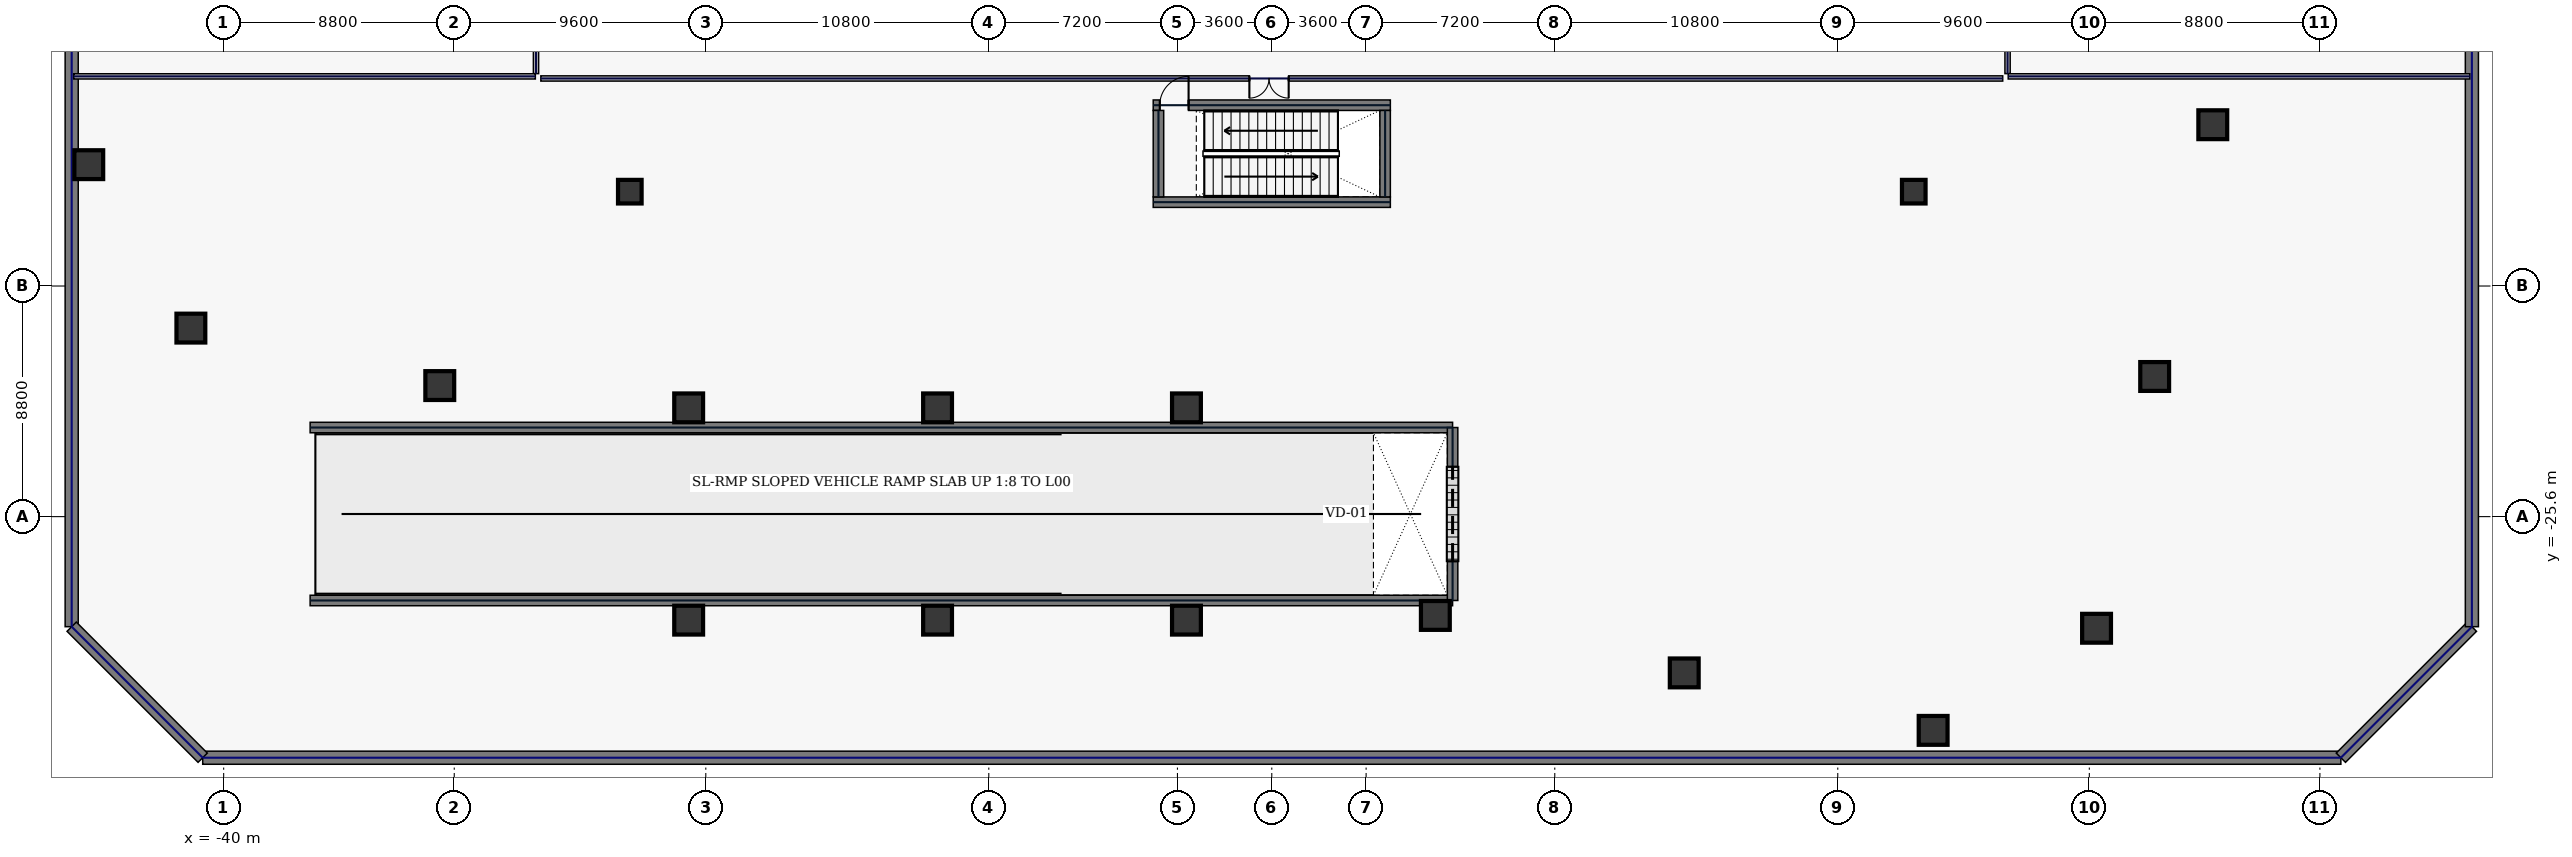
"""IFC4 building model, lengths in metres.
Left out: names, types, materials, properties, quantities, classifications, styles, units other than length and angle.
Written with IfcOpenShell. Run it as: python <this file> out.ifc"""

import sys

from ifc_helpers import new_model, si_unit, direction, frame, frame_2d, origin, origin_2d, place, context, subcontext, project, spatial, rectangle, extrude, element, fill, save


model = new_model("IFC4")
c1 = context("Model", 3, precision=1e-05, world=origin(), true_north=direction((0.0, 1.0)))
c2 = subcontext(c1, "Body", "Model", "MODEL_VIEW")
j1 = project(units=[si_unit("LENGTHUNIT", "METRE"), si_unit("PLANEANGLEUNIT", "RADIAN")], contexts=[c1])
p1 = place(None, origin())
s1 = spatial("IfcSite", under=j1, at=p1, CompositionType="ELEMENT")
p2 = place(p1, origin())
s2 = spatial("IfcBuilding", under=s1, at=p2, CompositionType="ELEMENT")
p3 = place(p2, frame((0.0, 0.0, -5.4)))
s3 = spatial("IfcBuildingStorey", under=s2, at=p3, CompositionType="ELEMENT", Elevation=-5.4)
p4 = place(p3, frame((-40.8, -34.8, 0.0), z_axis=(0.0, 0.0, 1.0), x_axis=(1.0, 0.0, 0.0)))
e1 = element("IfcWall", 1, at=p4, inside=s3, PredefinedType="SHEAR", context=c2, shape_type="SweptSolid", body=[
    extrude(rectangle(XDim=81.6, YDim=0.5, at=frame_2d((40.8, 0.0))), origin(), (0.0, 0.0, 1.0), 5.05),
])
p5 = place(p3, frame((40.8, -34.8, 0.0), z_axis=(0.0, 0.0, 1.0), x_axis=(0.707106781187, 0.707106781187, 0.0)))
e2 = element("IfcWall", 2, at=p5, inside=s3, PredefinedType="SHEAR", context=c2, shape_type="SweptSolid", body=[
    extrude(rectangle(XDim=7.071, YDim=0.5, at=frame_2d((3.536, 0.0))), origin(), (0.0, 0.0, 1.0), 5.05),
])
for number, where, z_axis, x_axis in (
    (3, (45.8, -29.8, 0.0), (0.0, 0.0, 1.0), (0.0, 1.0, 0.0)),
    (4, (-45.8, 26.4, 0.0), (0.0, 0.0, 1.0), (0.0, -1.0, 0.0)),
):
    element("IfcWall", number, at=place(p3, frame(where, z_axis=z_axis, x_axis=x_axis)), inside=s3, PredefinedType="SHEAR", context=c2, shape_type="SweptSolid", body=[
        extrude(rectangle(XDim=56.2, YDim=0.5, at=frame_2d((28.1, 0.0))), origin(), (0.0, 0.0, 1.0), 5.05),
    ])
p6 = place(p3, frame((-45.8, -29.8, 0.0), z_axis=(0.0, 0.0, 1.0), x_axis=(0.707106781187, -0.707106781187, 0.0)))
e5 = element("IfcWall", 5, at=p6, inside=s3, PredefinedType="SHEAR", context=c2, shape_type="SweptSolid", body=[
    extrude(rectangle(XDim=7.071, YDim=0.5, at=frame_2d((3.536, 0.0))), origin(), (0.0, 0.0, 1.0), 5.05),
])
for number, where, z_axis, x_axis in (
    (6, (-36.7, -28.8, 0.0), (0.0, 0.0, 1.0), (1.0, 0.0, 0.0)),
    (7, (-36.7, -22.2, 0.0), (0.0, 0.0, 1.0), (1.0, 0.0, 0.0)),
):
    element("IfcWall", number, at=place(p3, frame(where, z_axis=z_axis, x_axis=x_axis)), inside=s3, PredefinedType="SHEAR", context=c2, shape_type="SweptSolid", body=[
        extrude(rectangle(XDim=43.6, YDim=0.4, at=frame_2d((21.8, 0.0))), origin(), (0.0, 0.0, 1.0), 5.05),
    ])
p7 = place(p3, frame((6.9, -28.8, 0.0), z_axis=(0.0, 0.0, 1.0), x_axis=(0.0, 1.0, 0.0)))
e8 = element("IfcWall", 8, at=p7, inside=s3, PredefinedType="SHEAR", context=c2, shape_type="SweptSolid", body=[
    extrude(rectangle(XDim=6.6, YDim=0.4, at=frame_2d((3.3, 0.0))), origin(), (0.0, 0.0, 1.0), 5.05),
])
p8 = place(p7, frame((1.5, 0.0, 0.0)))
e9 = element("IfcOpeningElement", 9, at=p8, cuts=e8, PredefinedType="OPENING", context=c2, shape_type="SweptSolid", body=[
    extrude(rectangle(XDim=3.6, YDim=2.6, at=frame_2d((1.8, 1.3))), frame((0.0, 0.21, 0.0), z_axis=(0.0, -1.0, 0.0), x_axis=(1.0, 0.0, 0.0)), (0.0, 0.0, 1.0), 0.42),
])
p9 = place(p3, frame((-4.525, -13.6, 0.0), z_axis=(0.0, 0.0, 1.0), x_axis=(1.0, 0.0, 0.0)))
e10 = element("IfcWall", 10, at=p9, inside=s3, PredefinedType="SHEAR", context=c2, shape_type="SweptSolid", body=[
    extrude(rectangle(XDim=9.05, YDim=0.4, at=frame_2d((4.525, 0.0))), origin(), (0.0, 0.0, 1.0), 5.05),
])
p10 = place(p3, frame((-4.525, -9.9, 0.0), z_axis=(0.0, 0.0, 1.0), x_axis=(1.0, 0.0, 0.0)))
e11 = element("IfcWall", 11, at=p10, inside=s3, PredefinedType="SHEAR", context=c2, shape_type="SweptSolid", body=[
    extrude(rectangle(XDim=9.05, YDim=0.4, at=frame_2d((4.525, 0.0))), origin(), (0.0, 0.0, 1.0), 5.05),
])
p11 = place(p10, frame((0.25, 0.0, 0.0)))
e12 = element("IfcOpeningElement", 12, at=p11, cuts=e11, PredefinedType="OPENING", context=c2, shape_type="SweptSolid", body=[
    extrude(rectangle(XDim=1.1, YDim=2.2, at=frame_2d((0.55, 1.1))), frame((0.0, 0.21, 0.0), z_axis=(0.0, -1.0, 0.0), x_axis=(1.0, 0.0, 0.0)), (0.0, 0.0, 1.0), 0.42),
])
for number, where, z_axis, x_axis in (
    (13, (-4.325, -13.4, 0.0), (0.0, 0.0, 1.0), (0.0, 1.0, 0.0)),
    (14, (4.325, -13.4, 0.0), (0.0, 0.0, 1.0), (0.0, 1.0, 0.0)),
):
    element("IfcWall", number, at=place(p3, frame(where, z_axis=z_axis, x_axis=x_axis)), inside=s3, PredefinedType="SHEAR", context=c2, shape_type="SweptSolid", body=[
        extrude(rectangle(XDim=3.3, YDim=0.4, at=frame_2d((1.65, 0.0))), origin(), (0.0, 0.0, 1.0), 5.05),
    ])
for number, where, z_axis, x_axis in (
    (15, (-24.5, -13.2, 0.0), (0.0, 0.0, 1.0), (1.0, 0.0, 0.0)),
    (16, (24.5, -13.2, 0.0), (0.0, 0.0, 1.0), (1.0, 0.0, 0.0)),
):
    element("IfcColumn", number, at=place(p3, frame(where, z_axis=z_axis, x_axis=x_axis)), inside=s3, PredefinedType="COLUMN", context=c2, shape_type="SweptSolid", body=[
        extrude(rectangle(XDim=0.9, YDim=0.9, at=origin_2d()), origin(), (0.0, 0.0, 1.0), 5.05),
    ])
for number, where, z_axis, x_axis in (
    (17, (-41.251, -18.406, 0.0), (0.0, 0.0, 1.0), (1.0, 0.0, 0.0)),
    (18, (-31.752, -20.599, 0.0), (0.0, 0.0, 1.0), (1.0, 0.0, 0.0)),
    (19, (-22.254, -29.55, 0.0), (0.0, 0.0, 1.0), (1.0, 0.0, 0.0)),
    (20, (-22.254, -21.45, 0.0), (0.0, 0.0, 1.0), (1.0, 0.0, 0.0)),
    (21, (-12.755, -29.55, 0.0), (0.0, 0.0, 1.0), (1.0, 0.0, 0.0)),
    (22, (-12.755, -21.45, 0.0), (0.0, 0.0, 1.0), (1.0, 0.0, 0.0)),
    (23, (-3.256, -29.55, 0.0), (0.0, 0.0, 1.0), (1.0, 0.0, 0.0)),
    (24, (-3.256, -21.45, 0.0), (0.0, 0.0, 1.0), (1.0, 0.0, 0.0)),
    (25, (6.242, -29.371, 0.0), (0.0, 0.0, 1.0), (1.0, 0.0, 0.0)),
    (26, (15.741, -31.564, 0.0), (0.0, 0.0, 1.0), (1.0, 0.0, 0.0)),
    (27, (25.24, -33.757, 0.0), (0.0, 0.0, 1.0), (1.0, 0.0, 0.0)),
    (28, (31.476, -29.86, 0.0), (0.0, 0.0, 1.0), (1.0, 0.0, 0.0)),
    (29, (33.694, -20.252, 0.0), (0.0, 0.0, 1.0), (1.0, 0.0, 0.0)),
    (30, (35.912, -10.645, 0.0), (0.0, 0.0, 1.0), (1.0, 0.0, 0.0)),
    (31, (-45.148, -12.169, 0.0), (0.0, 0.0, 1.0), (1.0, 0.0, 0.0)),
):
    element("IfcColumn", number, at=place(p3, frame(where, z_axis=z_axis, x_axis=x_axis)), inside=s3, PredefinedType="COLUMN", context=c2, shape_type="SweptSolid", body=[
        extrude(rectangle(XDim=1.1, YDim=1.1, at=origin_2d()), origin(), (0.0, 0.0, 1.0), 5.05),
    ])
p12 = place(p3, frame((-28.08, -8.695, 0.0), z_axis=(0.0, 0.0, 1.0), x_axis=(0.0, 1.0, 0.0)))
e32 = element("IfcWall", 32, at=p12, inside=s3, PredefinedType="SOLIDWALL", context=c2, shape_type="SweptSolid", body=[
    extrude(rectangle(XDim=17.39, YDim=0.2, at=frame_2d((8.695, 0.0))), origin(), (0.0, 0.0, 1.0), 5.05),
])
p13 = place(p12, frame((10.45, 0.0, 0.0)))
e33 = element("IfcOpeningElement", 33, at=p13, cuts=e32, PredefinedType="OPENING", context=c2, shape_type="SweptSolid", body=[
    extrude(rectangle(XDim=1.5, YDim=2.3, at=frame_2d((0.75, 1.15))), frame((0.0, 0.11, 0.0), z_axis=(0.0, -1.0, 0.0), x_axis=(1.0, 0.0, 0.0)), (0.0, 0.0, 1.0), 0.22),
])
p14 = place(p3, frame((28.08, 8.695, 0.0), z_axis=(0.0, 0.0, 1.0), x_axis=(0.0, -1.0, 0.0)))
e34 = element("IfcWall", 34, at=p14, inside=s3, PredefinedType="SOLIDWALL", context=c2, shape_type="SweptSolid", body=[
    extrude(rectangle(XDim=17.39, YDim=0.2, at=frame_2d((8.695, 0.0))), origin(), (0.0, 0.0, 1.0), 5.05),
])
p15 = place(p14, frame((10.45, 0.0, 0.0)))
e35 = element("IfcOpeningElement", 35, at=p15, cuts=e34, PredefinedType="OPENING", context=c2, shape_type="SweptSolid", body=[
    extrude(rectangle(XDim=1.5, YDim=2.3, at=frame_2d((0.75, 1.15))), frame((0.0, 0.11, 0.0), z_axis=(0.0, -1.0, 0.0), x_axis=(1.0, 0.0, 0.0)), (0.0, 0.0, 1.0), 0.22),
])
p16 = place(p3, frame((27.895, -8.88, 0.0), z_axis=(0.0, 0.0, 1.0), x_axis=(-1.0, 0.0, 0.0)))
e36 = element("IfcWall", 36, at=p16, inside=s3, PredefinedType="SOLIDWALL", context=c2, shape_type="SweptSolid", body=[
    extrude(rectangle(XDim=55.79, YDim=0.2, at=frame_2d((27.895, 0.0))), origin(), (0.0, 0.0, 1.0), 5.05),
])
p17 = place(p16, frame((27.25, 0.0, 0.0)))
e37 = element("IfcOpeningElement", 37, at=p17, cuts=e36, PredefinedType="OPENING", context=c2, shape_type="SweptSolid", body=[
    extrude(rectangle(XDim=1.5, YDim=2.3, at=frame_2d((0.75, 1.15))), frame((0.0, 0.11, 0.0), z_axis=(0.0, -1.0, 0.0), x_axis=(1.0, 0.0, 0.0)), (0.0, 0.0, 1.0), 0.22),
])
for number, where, z_axis, x_axis in (
    (38, (-45.72, -8.8, 0.0), (0.0, 0.0, 1.0), (1.0, 0.0, 0.0)),
    (39, (28.105, -8.8, 0.0), (0.0, 0.0, 1.0), (1.0, 0.0, 0.0)),
):
    element("IfcWall", number, at=place(p3, frame(where, z_axis=z_axis, x_axis=x_axis)), inside=s3, PredefinedType="SOLIDWALL", context=c2, shape_type="SweptSolid", body=[
        extrude(rectangle(XDim=17.615, YDim=0.2, at=frame_2d((8.808, 0.0))), origin(), (0.0, 0.0, 1.0), 5.05),
    ])
p18 = place(p8, origin())
e40 = element("IfcDoor", 40, at=p18, inside=s3, OperationType="ROLLINGUP", PredefinedType="GATE", context=c2, shape_type="SweptSolid", body=[
    extrude(rectangle(XDim=3.6, YDim=2.6, at=frame_2d((1.8, 1.3))), frame((0.0, 0.025, 0.0), z_axis=(0.0, -1.0, 0.0), x_axis=(1.0, 0.0, 0.0)), (0.0, 0.0, 1.0), 0.05),
])
fill(e9, e40)
p19 = place(p11, origin())
e41 = element("IfcDoor", 41, at=p19, inside=s3, OperationType="SINGLE_SWING_RIGHT", PredefinedType="DOOR", context=c2, shape_type="SweptSolid", body=[
    extrude(rectangle(XDim=1.1, YDim=2.2, at=frame_2d((0.55, 1.1))), frame((0.0, 0.025, 0.0), z_axis=(0.0, -1.0, 0.0), x_axis=(1.0, 0.0, 0.0)), (0.0, 0.0, 1.0), 0.05),
])
fill(e12, e41)
p20 = place(p17, origin())
e42 = element("IfcDoor", 42, at=p20, inside=s3, OperationType="DOUBLE_SWING_LEFT", PredefinedType="DOOR", context=c2, shape_type="SweptSolid", body=[
    extrude(rectangle(XDim=1.5, YDim=2.3, at=frame_2d((0.75, 1.15))), frame((0.0, 0.025, 0.0), z_axis=(0.0, -1.0, 0.0), x_axis=(1.0, 0.0, 0.0)), (0.0, 0.0, 1.0), 0.05),
])
fill(e37, e42)
save(model, sys.argv[1])
